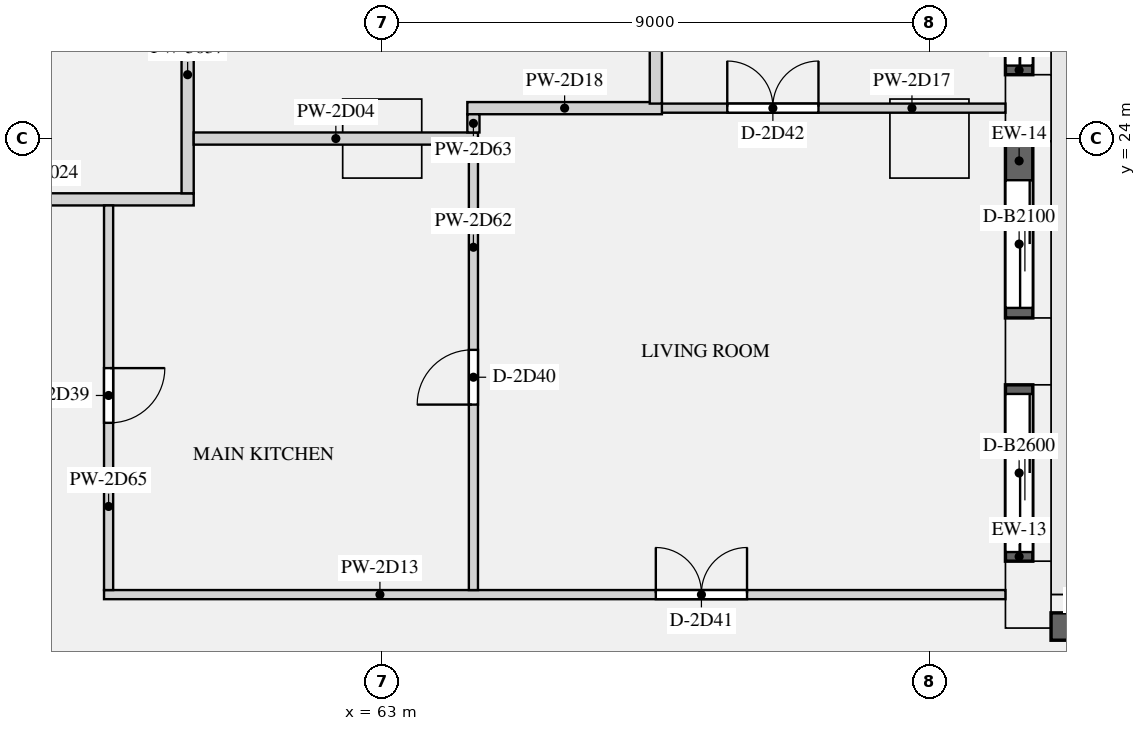
"""IFC4 building model, lengths in metres.
Left out: names, types, materials, properties, quantities, classifications, styles, units other than length and angle.
Written with IfcOpenShell. Run it as: python <this file> out.ifc"""

import sys

from ifc_helpers import new_model, si_unit, direction, frame, frame_2d, origin, origin_2d, place, context, subcontext, project, spatial, rectangle, extrude, element, fill, save


model = new_model("IFC4")
c1 = context("Model", 3, precision=1e-05, world=origin(), true_north=direction((0.0, 1.0)))
c2 = subcontext(c1, "Body", "Model", "MODEL_VIEW")
j1 = project(units=[si_unit("LENGTHUNIT", "METRE"), si_unit("PLANEANGLEUNIT", "RADIAN")], contexts=[c1])
p1 = place(None, origin())
s1 = spatial("IfcSite", under=j1, at=p1, CompositionType="ELEMENT")
p2 = place(p1, origin())
s2 = spatial("IfcBuilding", under=s1, at=p2, CompositionType="ELEMENT")
p3 = place(p2, frame((0.0, 0.0, 111.9)))
s3 = spatial("IfcBuildingStorey", under=s2, at=p3, CompositionType="ELEMENT", Elevation=111.9)
for number, where, z_axis, x_axis in (
    (1, (73.625, 16.5, 0.0), (0.0, 0.0, 1.0), (0.0, 1.0, 0.0)),
    (2, (73.625, 20.5, 0.0), (0.0, 0.0, 1.0), (0.0, 1.0, 0.0)),
    (3, (73.625, 24.5, 0.0), (0.0, 0.0, 1.0), (0.0, 1.0, 0.0)),
):
    element("IfcColumn", number, at=place(p3, frame(where, z_axis=z_axis, x_axis=x_axis)), inside=s3, PredefinedType="USERDEFINED", context=c2, shape_type="SweptSolid", body=[
        extrude(rectangle(XDim=1.1, YDim=0.75, at=origin_2d()), origin(), (0.0, 0.0, 1.0), 3.15),
    ])
for number, where, z_axis, x_axis in (
    (4, (63.0, 24.0, 0.0), (0.0, 0.0, 1.0), (1.0, 0.0, 0.0)),
    (5, (72.0, 24.0, 0.0), (0.0, 0.0, 1.0), (1.0, 0.0, 0.0)),
):
    element("IfcColumn", number, at=place(p3, frame(where, z_axis=z_axis, x_axis=x_axis)), inside=s3, PredefinedType="COLUMN", context=c2, shape_type="SweptSolid", body=[
        extrude(rectangle(XDim=1.3, YDim=1.3, at=origin_2d()), origin(), (0.0, 0.0, 1.0), 3.15),
    ])
p4 = place(p3, frame((75.4, 15.975, 0.9), z_axis=(0.0, 0.0, 1.0), x_axis=(-1.0, 0.0, 0.0)))
e6 = element("IfcWall", 6, at=p4, inside=s3, PredefinedType="SOLIDWALL", context=c2, shape_type="SweptSolid", body=[
    extrude(rectangle(XDim=1.4, YDim=0.45, at=frame_2d((0.7, 0.0))), origin(), (0.0, 0.0, 1.0), 1.93),
])
p5 = place(p3, frame((73.475, 17.05, 0.0), z_axis=(0.0, 0.0, 1.0), x_axis=(0.0, 1.0, 0.0)))
e7 = element("IfcWall", 7, at=p5, inside=s3, PredefinedType="SOLIDWALL", context=c2, shape_type="SweptSolid", body=[
    extrude(rectangle(XDim=2.9, YDim=0.45, at=frame_2d((1.45, 0.0))), origin(), (0.0, 0.0, 1.0), 2.83),
])
p6 = place(p5, frame((0.15, 0.0, 0.0)))
e8 = element("IfcOpeningElement", 8, at=p6, cuts=e7, PredefinedType="OPENING", context=c2, shape_type="SweptSolid", body=[
    extrude(rectangle(XDim=2.6, YDim=2.3, at=frame_2d((1.3, 1.15))), frame((0.0, 0.235, 0.0), z_axis=(0.0, -1.0, 0.0), x_axis=(1.0, 0.0, 0.0)), (0.0, 0.0, 1.0), 0.47),
])
p7 = place(p3, frame((73.475, 21.05, 0.0), z_axis=(0.0, 0.0, 1.0), x_axis=(0.0, 1.0, 0.0)))
e9 = element("IfcWall", 9, at=p7, inside=s3, PredefinedType="SOLIDWALL", context=c2, shape_type="SweptSolid", body=[
    extrude(rectangle(XDim=2.9, YDim=0.45, at=frame_2d((1.45, 0.0))), origin(), (0.0, 0.0, 1.0), 2.83),
])
p8 = place(p7, frame((0.165, 0.0, 0.0)))
e10 = element("IfcOpeningElement", 10, at=p8, cuts=e9, PredefinedType="OPENING", context=c2, shape_type="SweptSolid", body=[
    extrude(rectangle(XDim=2.1, YDim=2.3, at=frame_2d((1.05, 1.15))), frame((0.0, 0.235, 0.0), z_axis=(0.0, -1.0, 0.0), x_axis=(1.0, 0.0, 0.0)), (0.0, 0.0, 1.0), 0.47),
])
p9 = place(p3, frame((73.475, 25.05, 0.0), z_axis=(0.0, 0.0, 1.0), x_axis=(0.0, 1.0, 0.0)))
e11 = element("IfcWall", 11, at=p9, inside=s3, PredefinedType="SOLIDWALL", context=c2, shape_type="SweptSolid", body=[
    extrude(rectangle(XDim=3.45, YDim=0.45, at=frame_2d((1.725, 0.0))), origin(), (0.0, 0.0, 1.0), 2.83),
])
p10 = place(p9, frame((0.15, 0.0, 0.0)))
e12 = element("IfcOpeningElement", 12, at=p10, cuts=e11, PredefinedType="OPENING", context=c2, shape_type="SweptSolid", body=[
    extrude(rectangle(XDim=3.15, YDim=2.3, at=frame_2d((1.575, 1.15))), frame((0.0, 0.235, 0.0), z_axis=(0.0, -1.0, 0.0), x_axis=(1.0, 0.0, 0.0)), (0.0, 0.0, 1.0), 0.47),
])
p11 = place(p3, frame((54.9, 23.0, 0.0), z_axis=(0.0, 0.0, 1.0), x_axis=(1.0, 0.0, 0.0)))
e13 = element("IfcWall", 13, at=p11, inside=s3, PredefinedType="PARTITIONING", context=c2, shape_type="SweptSolid", body=[
    extrude(rectangle(XDim=5.0, YDim=0.2, at=frame_2d((2.5, 0.0))), origin(), (0.0, 0.0, 1.0), 2.83),
])
p12 = place(p3, frame((59.8, 23.1, 0.0), z_axis=(0.0, 0.0, 1.0), x_axis=(0.0, 1.0, 0.0)))
e14 = element("IfcWall", 14, at=p12, inside=s3, PredefinedType="PARTITIONING", context=c2, shape_type="SweptSolid", body=[
    extrude(rectangle(XDim=3.9, YDim=0.2, at=frame_2d((1.95, 0.0))), origin(), (0.0, 0.0, 1.0), 2.83),
])
p13 = place(p3, frame((59.9, 24.0, 0.0), z_axis=(0.0, 0.0, 1.0), x_axis=(1.0, 0.0, 0.0)))
e15 = element("IfcWall", 15, at=p13, inside=s3, PredefinedType="PARTITIONING", context=c2, shape_type="SweptSolid", body=[
    extrude(rectangle(XDim=4.675, YDim=0.2, at=frame_2d((2.337, 0.0))), origin(), (0.0, 0.0, 1.0), 2.83),
])
p14 = place(p3, frame((58.425, 16.5, 0.0), z_axis=(0.0, 0.0, 1.0), x_axis=(1.0, 0.0, 0.0)))
e16 = element("IfcWall", 16, at=p14, inside=s3, PredefinedType="PARTITIONING", context=c2, shape_type="SweptSolid", body=[
    extrude(rectangle(XDim=14.825, YDim=0.15, at=frame_2d((7.413, 0.0))), origin(), (0.0, 0.0, 1.0), 2.83),
])
p15 = place(p14, frame((9.075, 0.0, 0.0)))
e17 = element("IfcOpeningElement", 17, at=p15, cuts=e16, PredefinedType="OPENING", context=c2, shape_type="SweptSolid", body=[
    extrude(rectangle(XDim=1.5, YDim=2.1, at=frame_2d((0.75, 1.05))), frame((0.0, 0.085, 0.0), z_axis=(0.0, -1.0, 0.0), x_axis=(1.0, 0.0, 0.0)), (0.0, 0.0, 1.0), 0.17),
])
p16 = place(p3, frame((67.4, 24.5, 0.0), z_axis=(0.0, 0.0, 1.0), x_axis=(1.0, 0.0, 0.0)))
e18 = element("IfcWall", 18, at=p16, inside=s3, PredefinedType="PARTITIONING", context=c2, shape_type="SweptSolid", body=[
    extrude(rectangle(XDim=5.85, YDim=0.15, at=frame_2d((2.925, 0.0))), origin(), (0.0, 0.0, 1.0), 2.83),
])
p17 = place(p16, frame((1.275, 0.0, 0.0)))
e19 = element("IfcOpeningElement", 19, at=p17, cuts=e18, PredefinedType="OPENING", context=c2, shape_type="SweptSolid", body=[
    extrude(rectangle(XDim=1.5, YDim=2.1, at=frame_2d((0.75, 1.05))), frame((0.0, 0.085, 0.0), z_axis=(0.0, -1.0, 0.0), x_axis=(1.0, 0.0, 0.0)), (0.0, 0.0, 1.0), 0.17),
])
p18 = place(p3, frame((64.4, 24.5, 0.0), z_axis=(0.0, 0.0, 1.0), x_axis=(1.0, 0.0, 0.0)))
e20 = element("IfcWall", 20, at=p18, inside=s3, PredefinedType="PARTITIONING", context=c2, shape_type="SweptSolid", body=[
    extrude(rectangle(XDim=3.2, YDim=0.2, at=frame_2d((1.6, 0.0))), origin(), (0.0, 0.0, 1.0), 2.83),
])
p19 = place(p3, frame((67.5, 24.575, 0.0), z_axis=(0.0, 0.0, 1.0), x_axis=(0.0, 1.0, 0.0)))
e21 = element("IfcWall", 21, at=p19, inside=s3, PredefinedType="PARTITIONING", context=c2, shape_type="SweptSolid", body=[
    extrude(rectangle(XDim=20.175, YDim=0.2, at=frame_2d((10.087, 0.0))), origin(), (0.0, 0.0, 1.0), 2.83),
])
p20 = place(p3, frame((64.5, 16.575, 0.0), z_axis=(0.0, 0.0, 1.0), x_axis=(0.0, 1.0, 0.0)))
e22 = element("IfcWall", 22, at=p20, inside=s3, PredefinedType="PARTITIONING", context=c2, shape_type="SweptSolid", body=[
    extrude(rectangle(XDim=7.325, YDim=0.15, at=frame_2d((3.663, 0.0))), origin(), (0.0, 0.0, 1.0), 2.83),
])
p21 = place(p20, frame((3.05, 0.0, 0.0)))
e23 = element("IfcOpeningElement", 23, at=p21, cuts=e22, PredefinedType="OPENING", context=c2, shape_type="SweptSolid", body=[
    extrude(rectangle(XDim=0.9, YDim=2.1, at=frame_2d((0.45, 1.05))), frame((0.0, 0.085, 0.0), z_axis=(0.0, -1.0, 0.0), x_axis=(1.0, 0.0, 0.0)), (0.0, 0.0, 1.0), 0.17),
])
p22 = place(p3, frame((64.5, 24.1, 0.0), z_axis=(0.0, 0.0, 1.0), x_axis=(0.0, 1.0, 0.0)))
e24 = element("IfcWall", 24, at=p22, inside=s3, PredefinedType="PARTITIONING", context=c2, shape_type="SweptSolid", body=[
    extrude(rectangle(XDim=0.3, YDim=0.2, at=frame_2d((0.15, 0.0))), origin(), (0.0, 0.0, 1.0), 2.83),
])
p23 = place(p3, frame((58.5, 16.575, 0.0), z_axis=(0.0, 0.0, 1.0), x_axis=(0.0, 1.0, 0.0)))
e25 = element("IfcWall", 25, at=p23, inside=s3, PredefinedType="PARTITIONING", context=c2, shape_type="SweptSolid", body=[
    extrude(rectangle(XDim=6.325, YDim=0.15, at=frame_2d((3.163, 0.0))), origin(), (0.0, 0.0, 1.0), 2.83),
])
p24 = place(p23, frame((2.75, 0.0, 0.0)))
e26 = element("IfcOpeningElement", 26, at=p24, cuts=e25, PredefinedType="OPENING", context=c2, shape_type="SweptSolid", body=[
    extrude(rectangle(XDim=0.9, YDim=2.1, at=frame_2d((0.45, 1.05))), frame((0.0, 0.085, 0.0), z_axis=(0.0, -1.0, 0.0), x_axis=(1.0, 0.0, 0.0)), (0.0, 0.0, 1.0), 0.17),
])
p25 = place(p6, origin())
e27 = element("IfcDoor", 27, at=p25, inside=s3, OperationType="SLIDING_TO_LEFT", PredefinedType="DOOR", context=c2, shape_type="SweptSolid", body=[
    extrude(rectangle(XDim=2.6, YDim=2.3, at=frame_2d((1.3, 1.15))), frame((0.0, -0.07, 0.0), z_axis=(0.0, -1.0, 0.0), x_axis=(1.0, 0.0, 0.0)), (0.0, 0.0, 1.0), 0.05),
])
fill(e8, e27)
p26 = place(p8, origin())
e28 = element("IfcDoor", 28, at=p26, inside=s3, OperationType="SLIDING_TO_LEFT", PredefinedType="DOOR", context=c2, shape_type="SweptSolid", body=[
    extrude(rectangle(XDim=2.1, YDim=2.3, at=frame_2d((1.05, 1.15))), frame((0.0, -0.07, 0.0), z_axis=(0.0, -1.0, 0.0), x_axis=(1.0, 0.0, 0.0)), (0.0, 0.0, 1.0), 0.05),
])
fill(e10, e28)
p27 = place(p10, origin())
e29 = element("IfcDoor", 29, at=p27, inside=s3, OperationType="SLIDING_TO_LEFT", PredefinedType="DOOR", context=c2, shape_type="SweptSolid", body=[
    extrude(rectangle(XDim=3.15, YDim=2.3, at=frame_2d((1.575, 1.15))), frame((0.0, -0.07, 0.0), z_axis=(0.0, -1.0, 0.0), x_axis=(1.0, 0.0, 0.0)), (0.0, 0.0, 1.0), 0.05),
])
fill(e12, e29)
p28 = place(p24, frame((0.9, 0.0, 0.0), z_axis=(0.0, 0.0, 1.0), x_axis=(-1.0, 0.0, 0.0)))
e30 = element("IfcDoor", 30, at=p28, inside=s3, OperationType="SINGLE_SWING_LEFT", PredefinedType="DOOR", context=c2, shape_type="SweptSolid", body=[
    extrude(rectangle(XDim=0.9, YDim=2.1, at=frame_2d((0.45, 1.05))), frame((0.0, 0.025, 0.0), z_axis=(0.0, -1.0, 0.0), x_axis=(1.0, 0.0, 0.0)), (0.0, 0.0, 1.0), 0.05),
])
fill(e26, e30)
p29 = place(p21, origin())
e31 = element("IfcDoor", 31, at=p29, inside=s3, OperationType="SINGLE_SWING_LEFT", PredefinedType="DOOR", context=c2, shape_type="SweptSolid", body=[
    extrude(rectangle(XDim=0.9, YDim=2.1, at=frame_2d((0.45, 1.05))), frame((0.0, 0.025, 0.0), z_axis=(0.0, -1.0, 0.0), x_axis=(1.0, 0.0, 0.0)), (0.0, 0.0, 1.0), 0.05),
])
fill(e23, e31)
p30 = place(p15, origin())
e32 = element("IfcDoor", 32, at=p30, inside=s3, OperationType="DOUBLE_DOOR_SINGLE_SWING", PredefinedType="DOOR", context=c2, shape_type="SweptSolid", body=[
    extrude(rectangle(XDim=1.5, YDim=2.1, at=frame_2d((0.75, 1.05))), frame((0.0, 0.025, 0.0), z_axis=(0.0, -1.0, 0.0), x_axis=(1.0, 0.0, 0.0)), (0.0, 0.0, 1.0), 0.05),
])
fill(e17, e32)
p31 = place(p17, origin())
e33 = element("IfcDoor", 33, at=p31, inside=s3, OperationType="DOUBLE_DOOR_SINGLE_SWING", PredefinedType="DOOR", context=c2, shape_type="SweptSolid", body=[
    extrude(rectangle(XDim=1.5, YDim=2.1, at=frame_2d((0.75, 1.05))), frame((0.0, 0.025, 0.0), z_axis=(0.0, -1.0, 0.0), x_axis=(1.0, 0.0, 0.0)), (0.0, 0.0, 1.0), 0.05),
])
fill(e19, e33)
save(model, sys.argv[1])
